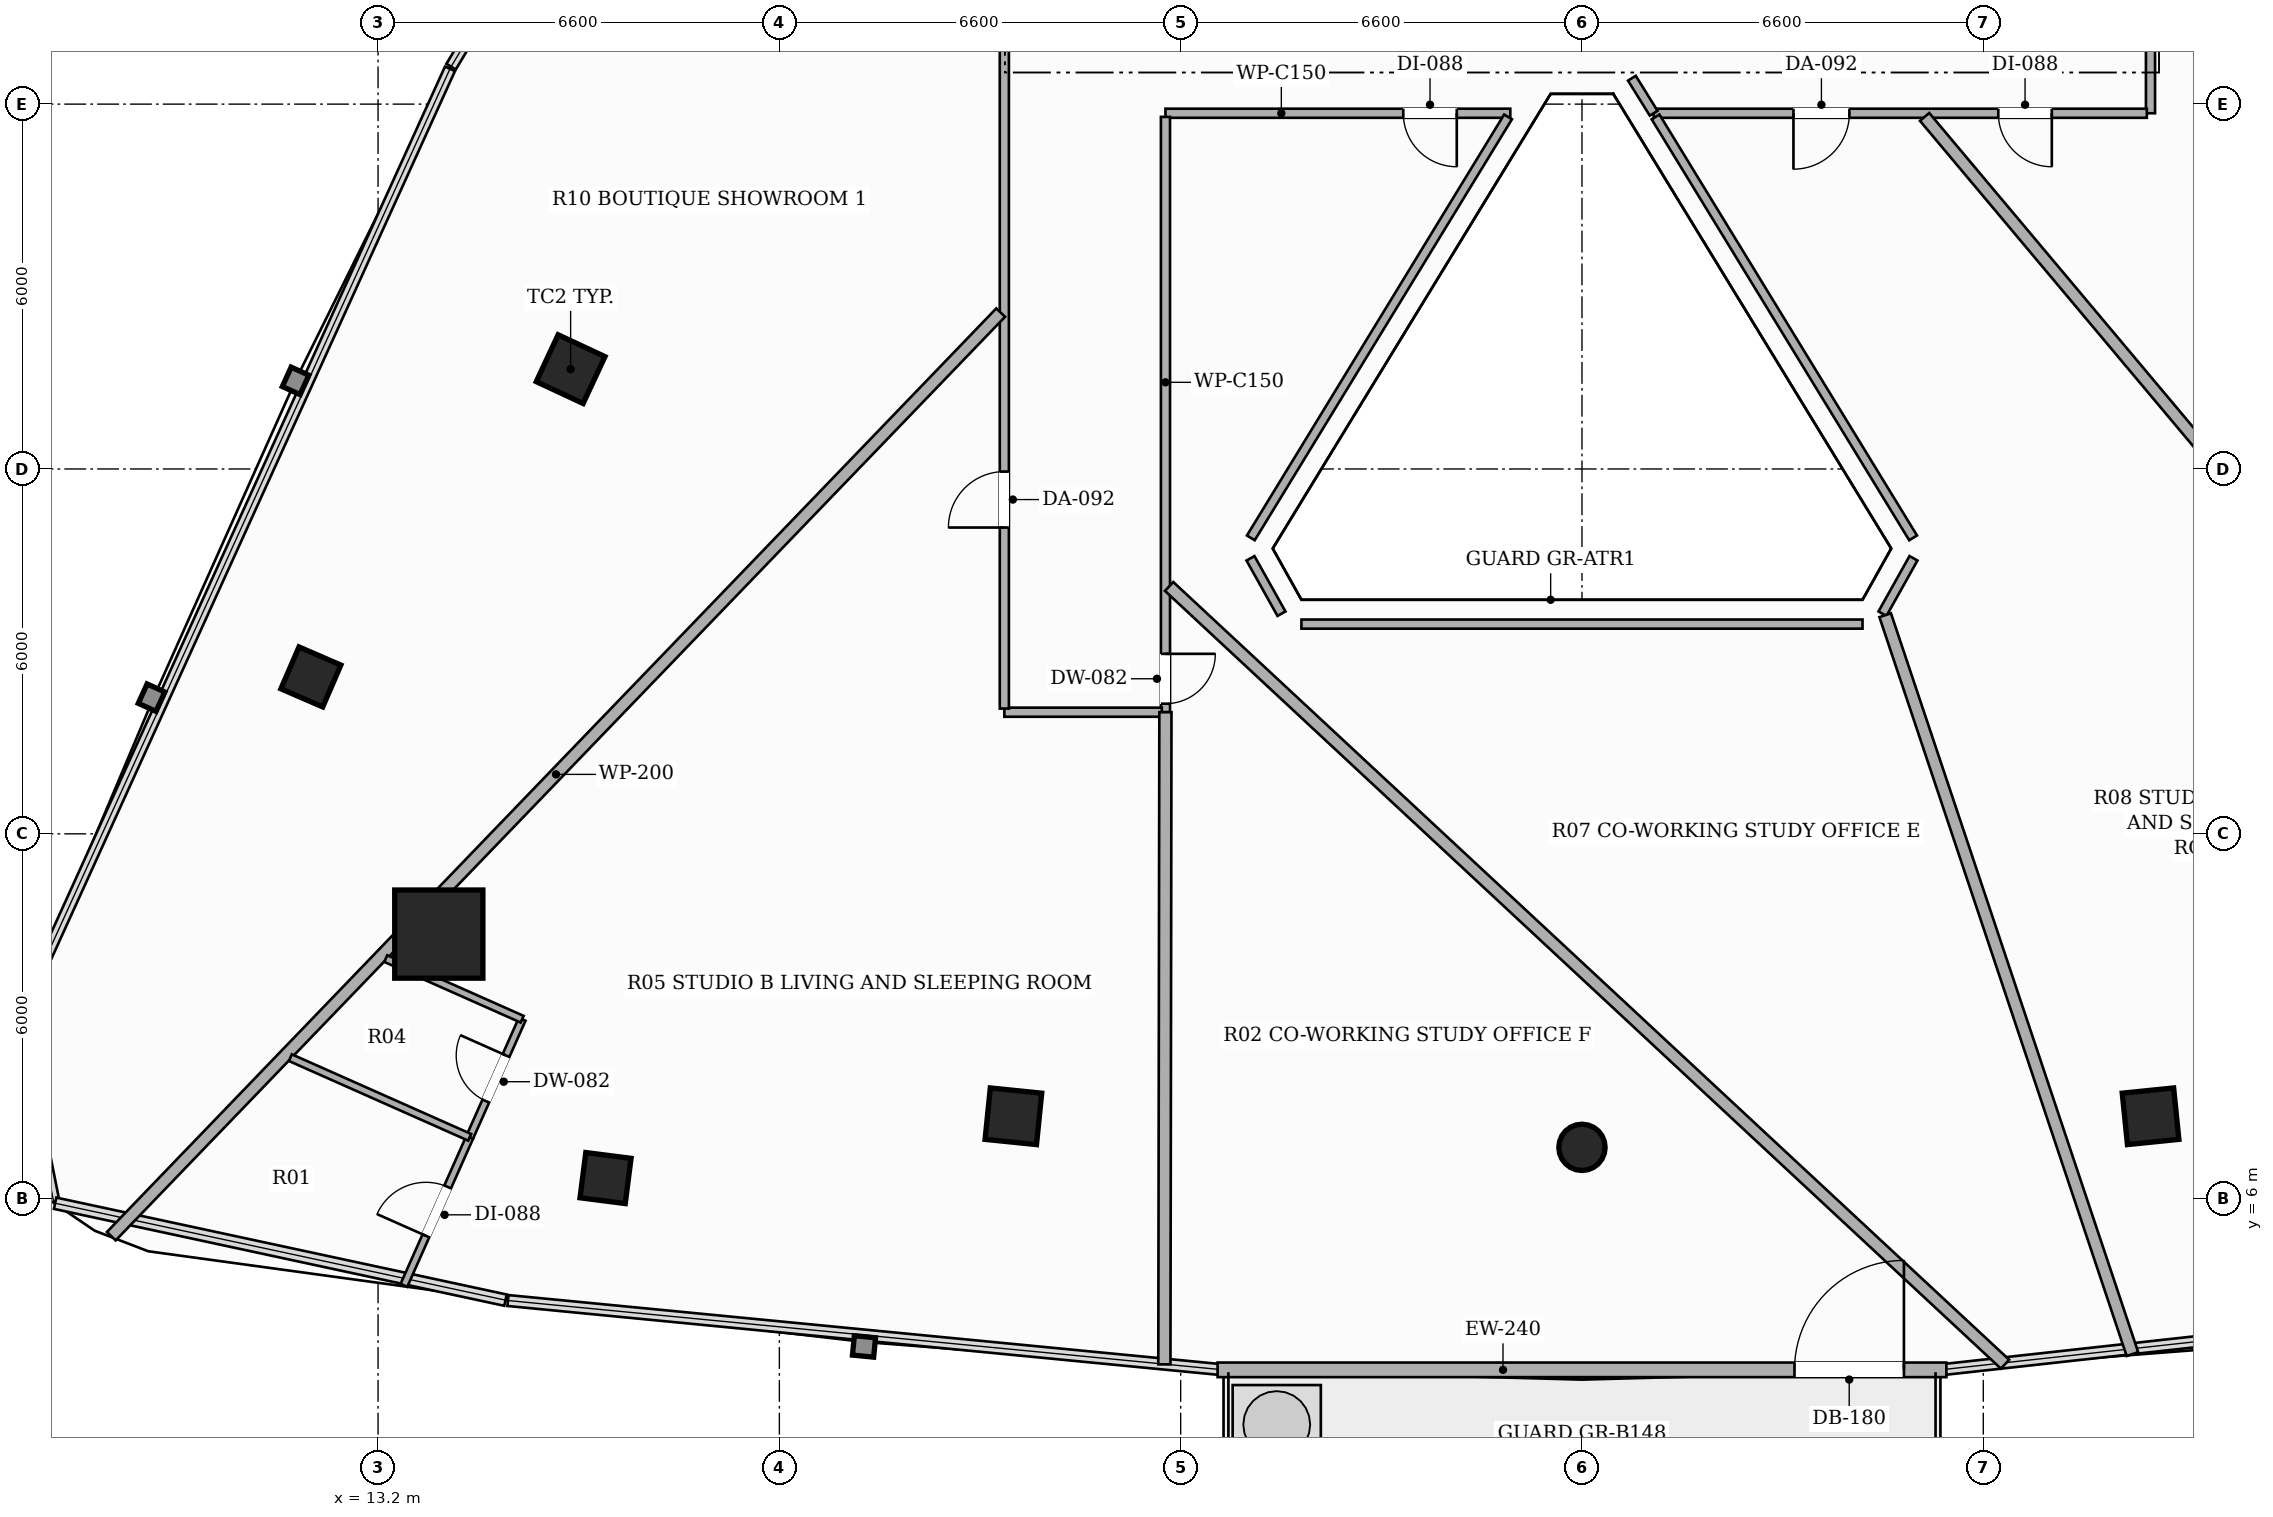
"""IFC4 building model, lengths in metres.
Left out: names, types, materials, properties, quantities, classifications, styles, units other than length and angle.
Written with IfcOpenShell. Run it as: python <this file> out.ifc"""

import sys

from ifc_helpers import new_model, si_unit, direction, frame, frame_2d, origin, origin_2d, place, context, subcontext, project, spatial, rectangle, hollow_rectangle, hollow_circle, extrude, element, fill, save


model = new_model("IFC4")
c1 = context("Model", 3, precision=1e-05, world=origin(), true_north=direction((0.0, 1.0)))
c2 = subcontext(c1, "Body", "Model", "MODEL_VIEW")
j1 = project(units=[si_unit("LENGTHUNIT", "METRE"), si_unit("PLANEANGLEUNIT", "RADIAN")], contexts=[c1])
p1 = place(None, origin())
s1 = spatial("IfcSite", under=j1, at=p1, CompositionType="ELEMENT")
p2 = place(p1, origin())
s2 = spatial("IfcBuilding", under=s1, at=p2, CompositionType="ELEMENT")
p3 = place(p2, frame((0.0, 0.0, 126.5)))
s3 = spatial("IfcBuildingStorey", under=s2, at=p3, CompositionType="ELEMENT", Elevation=126.5)
p4 = place(p3, frame((14.199, 10.351, 0.0), z_axis=(0.0, 0.0, 1.0), x_axis=(1.0, 0.0, 0.0)))
e1 = element("IfcColumn", 1, at=p4, inside=s3, PredefinedType="COLUMN", context=c2, shape_type="SweptSolid", body=[
    extrude(hollow_rectangle(XDim=1.45, YDim=1.45, WallThickness=0.045, at=origin_2d()), origin(), (0.0, 0.0, 1.0), 3.3),
])
for number, where, z_axis, x_axis in (
    (2, (16.367, 19.642, 0.0), (0.0, 0.0, 1.0), (0.423, 0.906, 0.0)),
    (3, (23.649, 7.355, 0.0), (0.0, 0.0, 1.0), (-0.995, 0.101, 0.0)),
):
    element("IfcColumn", number, at=place(p3, frame(where, z_axis=z_axis, x_axis=x_axis)), inside=s3, PredefinedType="COLUMN", context=c2, shape_type="SweptSolid", body=[
        extrude(hollow_rectangle(XDim=0.85, YDim=0.85, WallThickness=0.028, at=origin_2d()), origin(), (0.0, 0.0, 1.0), 3.3),
    ])
p5 = place(p3, frame((33.0, 6.844, 0.0), z_axis=(0.0, 0.0, 1.0), x_axis=(1.0, 0.0, 0.0)))
e4 = element("IfcColumn", 4, at=p5, inside=s3, PredefinedType="COLUMN", context=c2, shape_type="SweptSolid", body=[
    extrude(hollow_circle(Radius=0.381, WallThickness=0.022, at=origin_2d()), origin(), (0.0, 0.0, 1.0), 3.3),
])
p6 = place(p3, frame((42.351, 7.355, 0.0), z_axis=(0.0, 0.0, 1.0), x_axis=(0.994880708829, 0.101056297183, 0.0)))
e5 = element("IfcColumn", 5, at=p6, inside=s3, PredefinedType="COLUMN", context=c2, shape_type="SweptSolid", body=[
    extrude(hollow_rectangle(XDim=0.85, YDim=0.85, WallThickness=0.028, at=origin_2d()), origin(), (0.0, 0.0, 1.0), 3.3),
])
for number, where, z_axis, x_axis in (
    (6, (12.095, 14.58, 0.0), (0.0, 0.0, 1.0), (0.397, 0.918, 0.0)),
    (7, (16.941, 6.339, 0.0), (0.0, 0.0, 1.0), (-0.992, 0.127, 0.0)),
):
    element("IfcColumn", number, at=place(p3, frame(where, z_axis=z_axis, x_axis=x_axis)), inside=s3, PredefinedType="COLUMN", context=c2, shape_type="SweptSolid", body=[
        extrude(hollow_rectangle(XDim=0.75, YDim=0.75, WallThickness=0.025, at=origin_2d()), origin(), (0.0, 0.0, 1.0), 3.3),
    ])
p7 = place(p3, frame((27.007, 3.185, 0.0), z_axis=(0.0, 0.0, 1.0), x_axis=(1.0, 0.0, 0.0)))
e8 = element("IfcWall", 8, at=p7, inside=s3, PredefinedType="SOLIDWALL", context=c2, shape_type="SweptSolid", body=[
    extrude(rectangle(XDim=11.986, YDim=0.24, at=frame_2d((5.993, 0.0))), origin(), (0.0, 0.0, 1.0), 2.624),
])
p8 = place(p7, frame((9.488, 0.0, 0.0)))
e9 = element("IfcOpeningElement", 9, at=p8, cuts=e8, PredefinedType="OPENING", context=c2, shape_type="SweptSolid", body=[
    extrude(rectangle(XDim=1.8, YDim=2.2, at=frame_2d((0.9, 1.1))), frame((0.0, 0.13, 0.0), z_axis=(0.0, -1.0, 0.0), x_axis=(1.0, 0.0, 0.0)), (0.0, 0.0, 1.0), 0.26),
])
p9 = place(p3, frame((31.821, 23.85, 0.0), z_axis=(0.0, 0.0, 1.0), x_axis=(-1.0, 0.0, 0.0)))
e10 = element("IfcWall", 10, at=p9, inside=s3, PredefinedType="PARTITIONING", context=c2, shape_type="SweptSolid", body=[
    extrude(rectangle(XDim=5.671, YDim=0.15, at=frame_2d((2.835, 0.0))), origin(), (0.0, 0.0, 1.0), 2.721),
])
p10 = place(p9, frame((0.88, 0.0, 0.0)))
e11 = element("IfcOpeningElement", 11, at=p10, cuts=e10, PredefinedType="OPENING", context=c2, shape_type="SweptSolid", body=[
    extrude(rectangle(XDim=0.88, YDim=2.1, at=frame_2d((0.44, 1.05))), frame((0.0, 0.085, 0.0), z_axis=(0.0, -1.0, 0.0), x_axis=(1.0, 0.0, 0.0)), (0.0, 0.0, 1.0), 0.17),
])
p11 = place(p3, frame((26.15, 23.79, 0.0), z_axis=(0.0, 0.0, 1.0), x_axis=(0.0, -1.0, 0.0)))
e12 = element("IfcWall", 12, at=p11, inside=s3, PredefinedType="PARTITIONING", context=c2, shape_type="SweptSolid", body=[
    extrude(rectangle(XDim=9.79, YDim=0.15, at=frame_2d((4.895, 0.0))), origin(), (0.0, 0.0, 1.0), 2.721),
])
p12 = place(p11, frame((8.83, 0.0, 0.0)))
e13 = element("IfcOpeningElement", 13, at=p12, cuts=e12, PredefinedType="OPENING", context=c2, shape_type="SweptSolid", body=[
    extrude(rectangle(XDim=0.82, YDim=2.1, at=frame_2d((0.41, 1.05))), frame((0.0, 0.085, 0.0), z_axis=(0.0, -1.0, 0.0), x_axis=(1.0, 0.0, 0.0)), (0.0, 0.0, 1.0), 0.17),
])
p13 = place(p3, frame((26.09, 14.0, 0.0), z_axis=(0.0, 0.0, 1.0), x_axis=(-1.0, 0.0, 0.0)))
e14 = element("IfcWall", 14, at=p13, inside=s3, PredefinedType="PARTITIONING", context=c2, shape_type="SweptSolid", body=[
    extrude(rectangle(XDim=2.59, YDim=0.15, at=frame_2d((1.295, 0.0))), origin(), (0.0, 0.0, 1.0), 2.721),
])
p14 = place(p3, frame((23.5, 14.06, 0.0), z_axis=(0.0, 0.0, 1.0), x_axis=(0.0, 1.0, 0.0)))
e15 = element("IfcWall", 15, at=p14, inside=s3, PredefinedType="PARTITIONING", context=c2, shape_type="SweptSolid", body=[
    extrude(rectangle(XDim=22.84, YDim=0.15, at=frame_2d((11.42, 0.0))), origin(), (0.0, 0.0, 1.0), 2.413),
])
p15 = place(p14, frame((13.045, 0.0, 0.0)))
e16 = element("IfcOpeningElement", 16, at=p15, cuts=e15, PredefinedType="OPENING", context=c2, shape_type="SweptSolid", body=[
    extrude(rectangle(XDim=0.88, YDim=2.1, at=frame_2d((0.44, 1.05))), frame((0.0, 0.085, 0.0), z_axis=(0.0, -1.0, 0.0), x_axis=(1.0, 0.0, 0.0)), (0.0, 0.0, 1.0), 0.17),
])
p16 = place(p14, frame((2.977, 0.0, 0.0)))
e17 = element("IfcOpeningElement", 17, at=p16, cuts=e15, PredefinedType="OPENING", context=c2, shape_type="SweptSolid", body=[
    extrude(rectangle(XDim=0.92, YDim=2.15, at=frame_2d((0.46, 1.075))), frame((0.0, 0.085, 0.0), z_axis=(0.0, -1.0, 0.0), x_axis=(1.0, 0.0, 0.0)), (0.0, 0.0, 1.0), 0.17),
])
p17 = place(p3, frame((42.35, 28.34, 0.0), z_axis=(0.0, 0.0, 1.0), x_axis=(0.0, -1.0, 0.0)))
e18 = element("IfcWall", 18, at=p17, inside=s3, PredefinedType="PARTITIONING", context=c2, shape_type="SweptSolid", body=[
    extrude(rectangle(XDim=4.49, YDim=0.15, at=frame_2d((2.245, 0.0))), origin(), (0.0, 0.0, 1.0), 2.721),
])
p18 = place(p17, frame((1.13, 0.0, 0.0)))
e19 = element("IfcOpeningElement", 19, at=p18, cuts=e18, PredefinedType="OPENING", context=c2, shape_type="SweptSolid", body=[
    extrude(rectangle(XDim=0.88, YDim=2.1, at=frame_2d((0.44, 1.05))), frame((0.0, 0.085, 0.0), z_axis=(0.0, -1.0, 0.0), x_axis=(1.0, 0.0, 0.0)), (0.0, 0.0, 1.0), 0.17),
])
p19 = place(p3, frame((42.29, 23.85, 0.0), z_axis=(0.0, 0.0, 1.0), x_axis=(-1.0, 0.0, 0.0)))
e20 = element("IfcWall", 20, at=p19, inside=s3, PredefinedType="PARTITIONING", context=c2, shape_type="SweptSolid", body=[
    extrude(rectangle(XDim=8.111, YDim=0.15, at=frame_2d((4.056, 0.0))), origin(), (0.0, 0.0, 1.0), 2.492),
])
p20 = place(p19, frame((1.563, 0.0, 0.0)))
e21 = element("IfcOpeningElement", 21, at=p20, cuts=e20, PredefinedType="OPENING", context=c2, shape_type="SweptSolid", body=[
    extrude(rectangle(XDim=0.88, YDim=2.1, at=frame_2d((0.44, 1.05))), frame((0.0, 0.085, 0.0), z_axis=(0.0, -1.0, 0.0), x_axis=(1.0, 0.0, 0.0)), (0.0, 0.0, 1.0), 0.17),
])
p21 = place(p19, frame((4.892, 0.0, 0.0)))
e22 = element("IfcOpeningElement", 22, at=p21, cuts=e20, PredefinedType="OPENING", context=c2, shape_type="SweptSolid", body=[
    extrude(rectangle(XDim=0.92, YDim=2.15, at=frame_2d((0.46, 1.075))), frame((0.0, 0.085, 0.0), z_axis=(0.0, -1.0, 0.0), x_axis=(1.0, 0.0, 0.0)), (0.0, 0.0, 1.0), 0.17),
])
p22 = place(p3, frame((34.179, 23.85, 0.0), z_axis=(0.0, 0.0, 1.0), x_axis=(-0.527828834635, 0.849350764601, 0.0)))
e23 = element("IfcWall", 23, at=p22, inside=s3, PredefinedType="PARTITIONING", context=c2, shape_type="SweptSolid", body=[
    extrude(rectangle(XDim=0.678, YDim=0.15, at=frame_2d((0.339, 0.0))), origin(), (0.0, 0.0, 1.0), 3.06),
])
p23 = place(p3, frame((34.21, 23.79, 0.0), z_axis=(0.0, 0.0, 1.0), x_axis=(0.521925672495, -0.852990968528, 0.0)))
e24 = element("IfcWall", 24, at=p23, inside=s3, PredefinedType="PARTITIONING", context=c2, shape_type="SweptSolid", body=[
    extrude(rectangle(XDim=8.116, YDim=0.15, at=frame_2d((4.058, 0.0))), origin(), (0.0, 0.0, 1.0), 2.721),
])
p24 = place(p3, frame((38.452, 16.531, 0.0), z_axis=(0.0, 0.0, 1.0), x_axis=(-0.488539276118, -0.872541904833, 0.0)))
e25 = element("IfcWall", 25, at=p24, inside=s3, PredefinedType="PARTITIONING", context=c2, shape_type="SweptSolid", body=[
    extrude(rectangle(XDim=1.044, YDim=0.15, at=frame_2d((0.522, 0.0))), origin(), (0.0, 0.0, 1.0), 3.06),
])
p25 = place(p3, frame((37.614, 15.449, 0.0), z_axis=(0.0, 0.0, 1.0), x_axis=(-1.0, 0.0, 0.0)))
e26 = element("IfcWall", 26, at=p25, inside=s3, PredefinedType="PARTITIONING", context=c2, shape_type="SweptSolid", body=[
    extrude(rectangle(XDim=9.228, YDim=0.15, at=frame_2d((4.614, 0.0))), origin(), (0.0, 0.0, 1.0), 2.721),
])
p26 = place(p3, frame((28.058, 15.62, 0.0), z_axis=(0.0, 0.0, 1.0), x_axis=(-0.488539276118, 0.872541904833, 0.0)))
e27 = element("IfcWall", 27, at=p26, inside=s3, PredefinedType="PARTITIONING", context=c2, shape_type="SweptSolid", body=[
    extrude(rectangle(XDim=1.044, YDim=0.15, at=frame_2d((0.522, 0.0))), origin(), (0.0, 0.0, 1.0), 3.06),
])
p27 = place(p3, frame((27.554, 16.867, 0.0), z_axis=(0.0, 0.0, 1.0), x_axis=(0.521378191963, 0.853325717968, 0.0)))
e28 = element("IfcWall", 28, at=p27, inside=s3, PredefinedType="PARTITIONING", context=c2, shape_type="SweptSolid", body=[
    extrude(rectangle(XDim=8.113, YDim=0.15, at=frame_2d((4.057, 0.0))), origin(), (0.0, 0.0, 1.0), 2.721),
])
p28 = place(p3, frame((23.44, 20.572, 0.0), z_axis=(0.0, 0.0, 1.0), x_axis=(-0.693655036552, -0.720307358193, 0.0)))
e29 = element("IfcWall", 29, at=p28, inside=s3, PredefinedType="PARTITIONING", context=c2, shape_type="SweptSolid", body=[
    extrude(rectangle(XDim=21.087, YDim=0.2, at=frame_2d((10.543, 0.0))), origin(), (0.0, 0.0, 1.0), 2.413),
])
p29 = place(p3, frame((54.526, 4.867, 0.0), z_axis=(0.0, 0.0, 1.0), x_axis=(-0.643084567011, 0.765795168222, 0.0)))
e30 = element("IfcWall", 30, at=p29, inside=s3, PredefinedType="PARTITIONING", context=c2, shape_type="SweptSolid", body=[
    extrude(rectangle(XDim=24.71, YDim=0.2, at=frame_2d((12.355, 0.0))), origin(), (0.0, 0.0, 1.0), 2.413),
])
p30 = place(p3, frame((42.41, 25.497, 0.0), z_axis=(0.0, 0.0, 1.0), x_axis=(0.882944726502, -0.46947695358, 0.0)))
e31 = element("IfcWall", 31, at=p30, inside=s3, PredefinedType="PARTITIONING", context=c2, shape_type="SweptSolid", body=[
    extrude(rectangle(XDim=13.426, YDim=0.2, at=frame_2d((6.713, 0.0))), origin(), (0.0, 0.0, 1.0), 2.413),
])
p31 = place(p3, frame((42.053, 3.444, 0.0), z_axis=(0.0, 0.0, 1.0), x_axis=(-0.317325063931, 0.948316826699, 0.0)))
e32 = element("IfcWall", 32, at=p31, inside=s3, PredefinedType="PARTITIONING", context=c2, shape_type="SweptSolid", body=[
    extrude(rectangle(XDim=12.813, YDim=0.2, at=frame_2d((6.406, 0.0))), origin(), (0.0, 0.0, 1.0), 2.413),
])
p32 = place(p3, frame((26.149, 14.0, 0.0), z_axis=(0.0, 0.0, 1.0), x_axis=(-0.001570678691, -0.999998766483, 0.0)))
e33 = element("IfcWall", 33, at=p32, inside=s3, PredefinedType="PARTITIONING", context=c2, shape_type="SweptSolid", body=[
    extrude(rectangle(XDim=10.725, YDim=0.2, at=frame_2d((5.363, 0.0))), origin(), (0.0, 0.0, 1.0), 2.413),
])
p33 = place(p3, frame((39.958, 3.278, 0.0), z_axis=(0.0, 0.0, 1.0), x_axis=(-0.732155976475, 0.681137009795, 0.0)))
e34 = element("IfcWall", 34, at=p33, inside=s3, PredefinedType="PARTITIONING", context=c2, shape_type="SweptSolid", body=[
    extrude(rectangle(XDim=18.778, YDim=0.2, at=frame_2d((9.389, 0.0))), origin(), (0.0, 0.0, 1.0), 2.413),
])
p34 = place(p3, frame((14.707, 7.009, 0.0), z_axis=(0.0, 0.0, 1.0), x_axis=(0.406127806348, 0.913816286193, 0.0)))
e35 = element("IfcWall", 35, at=p34, inside=s3, PredefinedType="PARTITIONING", context=c2, shape_type="SweptSolid", body=[
    extrude(rectangle(XDim=2.125, YDim=0.12, at=frame_2d((1.062, 0.0))), origin(), (0.0, 0.0, 1.0), 2.413),
])
p35 = place(p34, frame((0.653, 0.0, 0.0)))
e36 = element("IfcOpeningElement", 36, at=p35, cuts=e35, PredefinedType="OPENING", context=c2, shape_type="SweptSolid", body=[
    extrude(rectangle(XDim=0.82, YDim=2.1, at=frame_2d((0.41, 1.05))), frame((0.0, 0.07, 0.0), z_axis=(0.0, -1.0, 0.0), x_axis=(1.0, 0.0, 0.0)), (0.0, 0.0, 1.0), 0.14),
])
p36 = place(p3, frame((15.57, 8.951, 0.0), z_axis=(0.0, 0.0, 1.0), x_axis=(-0.91379514288, 0.406175376961, 0.0)))
e37 = element("IfcWall", 37, at=p36, inside=s3, PredefinedType="PARTITIONING", context=c2, shape_type="SweptSolid", body=[
    extrude(rectangle(XDim=2.455, YDim=0.12, at=frame_2d((1.228, 0.0))), origin(), (0.0, 0.0, 1.0), 2.413),
])
p37 = place(p3, frame((13.625, 4.574, 0.0), z_axis=(0.0, 0.0, 1.0), x_axis=(0.406070456553, 0.913841772034, 0.0)))
e38 = element("IfcWall", 38, at=p37, inside=s3, PredefinedType="PARTITIONING", context=c2, shape_type="SweptSolid", body=[
    extrude(rectangle(XDim=2.665, YDim=0.12, at=frame_2d((1.332, 0.0))), origin(), (0.0, 0.0, 1.0), 3.06),
])
p38 = place(p37, frame((0.892, 0.0, 0.0)))
e39 = element("IfcOpeningElement", 39, at=p38, cuts=e38, PredefinedType="OPENING", context=c2, shape_type="SweptSolid", body=[
    extrude(rectangle(XDim=0.88, YDim=2.1, at=frame_2d((0.44, 1.05))), frame((0.0, 0.07, 0.0), z_axis=(0.0, -1.0, 0.0), x_axis=(1.0, 0.0, 0.0)), (0.0, 0.0, 1.0), 0.14),
])
p39 = place(p3, frame((14.707, 7.009, 0.0), z_axis=(0.0, 0.0, 1.0), x_axis=(-0.913880174296, 0.40598402312, 0.0)))
e40 = element("IfcWall", 40, at=p39, inside=s3, PredefinedType="PARTITIONING", context=c2, shape_type="SweptSolid", body=[
    extrude(rectangle(XDim=3.227, YDim=0.12, at=frame_2d((1.613, 0.0))), origin(), (0.0, 0.0, 1.0), 3.06),
])
p40 = place(p8, origin())
e41 = element("IfcDoor", 41, at=p40, inside=s3, OperationType="SINGLE_SWING_RIGHT", PredefinedType="DOOR", context=c2, shape_type="SweptSolid", body=[
    extrude(rectangle(XDim=1.8, YDim=2.2, at=frame_2d((0.9, 1.1))), frame((0.0, 0.025, 0.0), z_axis=(0.0, -1.0, 0.0), x_axis=(1.0, 0.0, 0.0)), (0.0, 0.0, 1.0), 0.05),
])
fill(e9, e41)
p41 = place(p20, origin())
e42 = element("IfcDoor", 42, at=p41, inside=s3, OperationType="SINGLE_SWING_LEFT", PredefinedType="DOOR", context=c2, shape_type="SweptSolid", body=[
    extrude(rectangle(XDim=0.88, YDim=2.1, at=frame_2d((0.44, 1.05))), frame((0.0, 0.025, 0.0), z_axis=(0.0, -1.0, 0.0), x_axis=(1.0, 0.0, 0.0)), (0.0, 0.0, 1.0), 0.05),
])
fill(e21, e42)
p42 = place(p21, origin())
e43 = element("IfcDoor", 43, at=p42, inside=s3, OperationType="SINGLE_SWING_RIGHT", PredefinedType="DOOR", context=c2, shape_type="SweptSolid", body=[
    extrude(rectangle(XDim=0.92, YDim=2.15, at=frame_2d((0.46, 1.075))), frame((0.0, 0.025, 0.0), z_axis=(0.0, -1.0, 0.0), x_axis=(1.0, 0.0, 0.0)), (0.0, 0.0, 1.0), 0.05),
])
fill(e22, e43)
p43 = place(p16, origin())
e44 = element("IfcDoor", 44, at=p43, inside=s3, OperationType="SINGLE_SWING_LEFT", PredefinedType="DOOR", context=c2, shape_type="SweptSolid", body=[
    extrude(rectangle(XDim=0.92, YDim=2.15, at=frame_2d((0.46, 1.075))), frame((0.0, 0.025, 0.0), z_axis=(0.0, -1.0, 0.0), x_axis=(1.0, 0.0, 0.0)), (0.0, 0.0, 1.0), 0.05),
])
fill(e17, e44)
p44 = place(p35, origin())
e45 = element("IfcDoor", 45, at=p44, inside=s3, OperationType="SINGLE_SWING_RIGHT", PredefinedType="DOOR", context=c2, shape_type="SweptSolid", body=[
    extrude(rectangle(XDim=0.82, YDim=2.1, at=frame_2d((0.41, 1.05))), frame((0.0, 0.025, 0.0), z_axis=(0.0, -1.0, 0.0), x_axis=(1.0, 0.0, 0.0)), (0.0, 0.0, 1.0), 0.05),
])
fill(e36, e45)
p45 = place(p38, origin())
e46 = element("IfcDoor", 46, at=p45, inside=s3, OperationType="SINGLE_SWING_LEFT", PredefinedType="DOOR", context=c2, shape_type="SweptSolid", body=[
    extrude(rectangle(XDim=0.88, YDim=2.1, at=frame_2d((0.44, 1.05))), frame((0.0, 0.025, 0.0), z_axis=(0.0, -1.0, 0.0), x_axis=(1.0, 0.0, 0.0)), (0.0, 0.0, 1.0), 0.05),
])
fill(e39, e46)
p46 = place(p10, origin())
e47 = element("IfcDoor", 47, at=p46, inside=s3, OperationType="SINGLE_SWING_LEFT", PredefinedType="DOOR", context=c2, shape_type="SweptSolid", body=[
    extrude(rectangle(XDim=0.88, YDim=2.1, at=frame_2d((0.44, 1.05))), frame((0.0, 0.025, 0.0), z_axis=(0.0, -1.0, 0.0), x_axis=(1.0, 0.0, 0.0)), (0.0, 0.0, 1.0), 0.05),
])
fill(e11, e47)
p47 = place(p12, origin())
e48 = element("IfcDoor", 48, at=p47, inside=s3, OperationType="SINGLE_SWING_LEFT", PredefinedType="DOOR", context=c2, shape_type="SweptSolid", body=[
    extrude(rectangle(XDim=0.82, YDim=2.1, at=frame_2d((0.41, 1.05))), frame((0.0, 0.025, 0.0), z_axis=(0.0, -1.0, 0.0), x_axis=(1.0, 0.0, 0.0)), (0.0, 0.0, 1.0), 0.05),
])
fill(e13, e48)
save(model, sys.argv[1])
